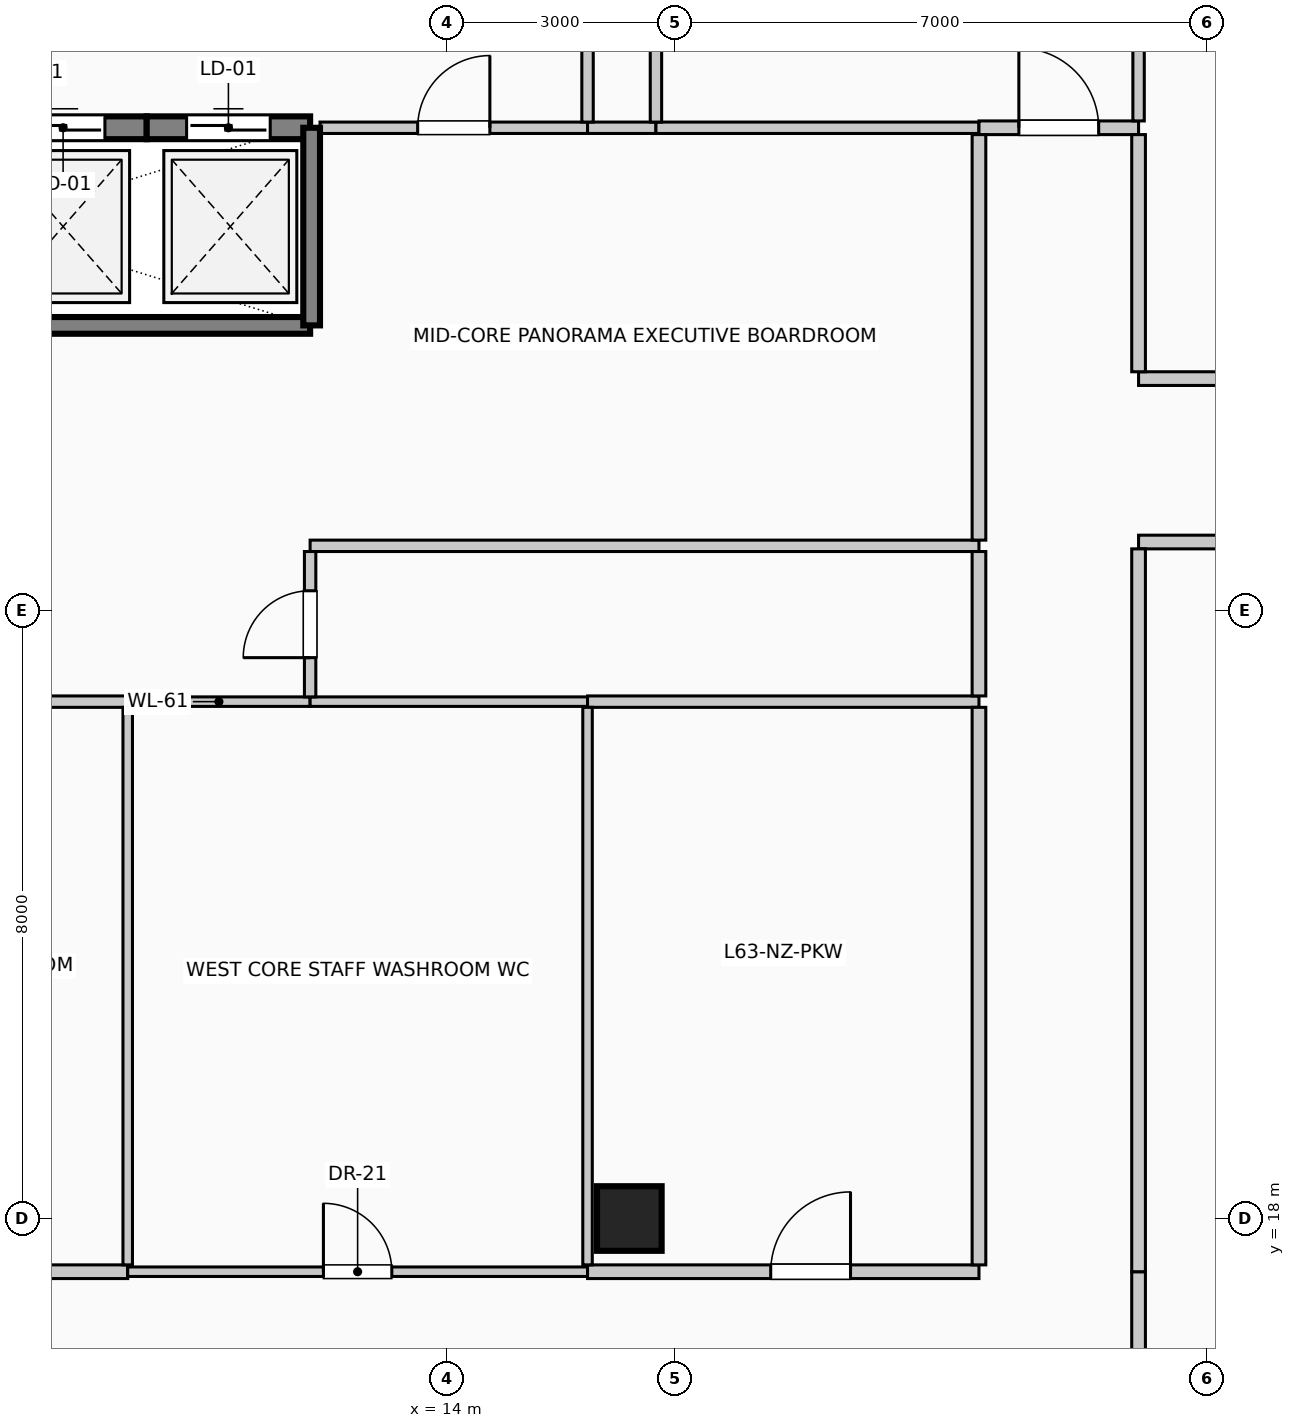
"""IFC4 building model, lengths in metres.
Left out: names, types, materials, properties, quantities, classifications, styles, units other than length and angle.
Written with IfcOpenShell. Run it as: python <this file> out.ifc"""

import sys

from ifc_helpers import new_model, si_unit, direction, frame, frame_2d, origin, origin_2d, place, context, subcontext, project, spatial, rectangle, circle, extrude, element, fill, save


model = new_model("IFC4")
c1 = context("Model", 3, precision=1e-05, world=origin(), true_north=direction((0.0, 1.0)))
c2 = subcontext(c1, "Body", "Model", "MODEL_VIEW")
j1 = project(units=[si_unit("LENGTHUNIT", "METRE"), si_unit("PLANEANGLEUNIT", "RADIAN")], contexts=[c1])
p1 = place(None, origin())
s1 = spatial("IfcSite", under=j1, at=p1, CompositionType="ELEMENT")
p2 = place(p1, origin())
s2 = spatial("IfcBuilding", under=s1, at=p2, CompositionType="ELEMENT")
p3 = place(p2, frame((0.0, 0.0, 260.6)))
s3 = spatial("IfcBuildingStorey", under=s2, at=p3, CompositionType="ELEMENT", Elevation=260.6)
p4 = place(p3, frame((16.4, 18.0, 0.0), z_axis=(0.0, 0.0, 1.0), x_axis=(1.0, 0.0, 0.0)))
e1 = element("IfcColumn", 1, at=p4, inside=s3, PredefinedType="COLUMN", context=c2, shape_type="SweptSolid", body=[
    extrude(circle(Radius=0.425, at=origin_2d()), origin(), (0.0, 0.0, 1.0), 4.0),
])
p5 = place(p3, frame((7.85, 32.35, 0.0), z_axis=(0.0, 0.0, 1.0), x_axis=(1.0, 0.0, 0.0)))
e2 = element("IfcWall", 2, at=p5, inside=s3, PredefinedType="SOLIDWALL", context=c2, shape_type="SweptSolid", body=[
    extrude(rectangle(XDim=2.2, YDim=0.3, at=frame_2d((1.1, 0.0))), origin(), (0.0, 0.0, 1.0), 4.0),
])
p6 = place(p5, frame((0.55, 0.0, 0.0)))
e3 = element("IfcOpeningElement", 3, at=p6, cuts=e2, PredefinedType="OPENING", context=c2, shape_type="SweptSolid", body=[
    extrude(rectangle(XDim=1.1, YDim=2.2, at=frame_2d((0.55, 1.1))), frame((0.0, 0.16, 0.0), z_axis=(0.0, -1.0, 0.0), x_axis=(1.0, 0.0, 0.0)), (0.0, 0.0, 1.0), 0.32),
])
p7 = place(p3, frame((10.05, 32.35, 0.0), z_axis=(0.0, 0.0, 1.0), x_axis=(1.0, 0.0, 0.0)))
e4 = element("IfcWall", 4, at=p7, inside=s3, PredefinedType="SOLIDWALL", context=c2, shape_type="SweptSolid", body=[
    extrude(rectangle(XDim=2.15, YDim=0.3, at=frame_2d((1.075, 0.0))), origin(), (0.0, 0.0, 1.0), 4.0),
])
p8 = place(p7, frame((0.525, 0.0, 0.0)))
e5 = element("IfcOpeningElement", 5, at=p8, cuts=e4, PredefinedType="OPENING", context=c2, shape_type="SweptSolid", body=[
    extrude(rectangle(XDim=1.1, YDim=2.2, at=frame_2d((0.55, 1.1))), frame((0.0, 0.16, 0.0), z_axis=(0.0, -1.0, 0.0), x_axis=(1.0, 0.0, 0.0)), (0.0, 0.0, 1.0), 0.32),
])
p9 = place(p3, frame((3.55, 29.75, 0.0), z_axis=(0.0, 0.0, 1.0), x_axis=(1.0, 0.0, 0.0)))
e6 = element("IfcWall", 6, at=p9, inside=s3, PredefinedType="SOLIDWALL", context=c2, shape_type="SweptSolid", body=[
    extrude(rectangle(XDim=8.65, YDim=0.22, at=frame_2d((4.325, 0.0))), origin(), (0.0, 0.0, 1.0), 4.0),
])
p10 = place(p3, frame((12.22, 29.75, 0.0), z_axis=(0.0, 0.0, 1.0), x_axis=(0.0, 1.0, 0.0)))
e7 = element("IfcWall", 7, at=p10, inside=s3, PredefinedType="SOLIDWALL", context=c2, shape_type="SweptSolid", body=[
    extrude(rectangle(XDim=2.6, YDim=0.22, at=frame_2d((1.3, 0.0))), origin(), (0.0, 0.0, 1.0), 4.0),
])
p11 = place(p3, frame((3.55, 17.3, 0.0), z_axis=(0.0, 0.0, 1.0), x_axis=(1.0, 0.0, 0.0)))
e8 = element("IfcWall", 8, at=p11, inside=s3, PredefinedType="PARTITIONING", context=c2, shape_type="SweptSolid", body=[
    extrude(rectangle(XDim=6.25, YDim=0.18, at=frame_2d((3.125, 0.0))), origin(), (0.0, 0.0, 1.0), 3.75),
])
p12 = place(p11, frame((2.6, 0.0, 0.0)))
e9 = element("IfcOpeningElement", 9, at=p12, cuts=e8, PredefinedType="OPENING", context=c2, shape_type="SweptSolid", body=[
    extrude(rectangle(XDim=1.05, YDim=2.15, at=frame_2d((0.525, 1.075))), frame((0.0, 0.1, 0.0), z_axis=(0.0, -1.0, 0.0), x_axis=(1.0, 0.0, 0.0)), (0.0, 0.0, 1.0), 0.2),
])
p13 = place(p3, frame((9.8, 17.3, 0.0), z_axis=(0.0, 0.0, 1.0), x_axis=(1.0, 0.0, 0.0)))
e10 = element("IfcWall", 10, at=p13, inside=s3, PredefinedType="PARTITIONING", context=c2, shape_type="SweptSolid", body=[
    extrude(rectangle(XDim=6.05, YDim=0.125, at=frame_2d((3.025, 0.0))), origin(), (0.0, 0.0, 1.0), 3.75),
])
p14 = place(p13, frame((2.575, 0.0, 0.0)))
e11 = element("IfcOpeningElement", 11, at=p14, cuts=e10, PredefinedType="OPENING", context=c2, shape_type="SweptSolid", body=[
    extrude(rectangle(XDim=0.9, YDim=2.1, at=frame_2d((0.45, 1.05))), frame((0.0, 0.073, 0.0), z_axis=(0.0, -1.0, 0.0), x_axis=(1.0, 0.0, 0.0)), (0.0, 0.0, 1.0), 0.145),
])
p15 = place(p3, frame((15.85, 17.3, 0.0), z_axis=(0.0, 0.0, 1.0), x_axis=(1.0, 0.0, 0.0)))
e12 = element("IfcWall", 12, at=p15, inside=s3, PredefinedType="PARTITIONING", context=c2, shape_type="SweptSolid", body=[
    extrude(rectangle(XDim=5.15, YDim=0.18, at=frame_2d((2.575, 0.0))), origin(), (0.0, 0.0, 1.0), 3.75),
])
p16 = place(p15, frame((2.41, 0.0, 0.0)))
e13 = element("IfcOpeningElement", 13, at=p16, cuts=e12, PredefinedType="OPENING", context=c2, shape_type="SweptSolid", body=[
    extrude(rectangle(XDim=1.05, YDim=2.15, at=frame_2d((0.525, 1.075))), frame((0.0, 0.1, 0.0), z_axis=(0.0, -1.0, 0.0), x_axis=(1.0, 0.0, 0.0)), (0.0, 0.0, 1.0), 0.2),
])
p17 = place(p3, frame((3.55, 24.8, 0.0), z_axis=(0.0, 0.0, 1.0), x_axis=(1.0, 0.0, 0.0)))
e14 = element("IfcWall", 14, at=p17, inside=s3, PredefinedType="PARTITIONING", context=c2, shape_type="SweptSolid", body=[
    extrude(rectangle(XDim=6.25, YDim=0.15, at=frame_2d((3.125, 0.0))), origin(), (0.0, 0.0, 1.0), 3.75),
])
p18 = place(p3, frame((9.8, 24.8, 0.0), z_axis=(0.0, 0.0, 1.0), x_axis=(1.0, 0.0, 0.0)))
e15 = element("IfcWall", 15, at=p18, inside=s3, PredefinedType="PARTITIONING", context=c2, shape_type="SweptSolid", body=[
    extrude(rectangle(XDim=2.4, YDim=0.125, at=frame_2d((1.2, 0.0))), origin(), (0.0, 0.0, 1.0), 3.75),
])
p19 = place(p3, frame((12.2, 24.8, 0.0), z_axis=(0.0, 0.0, 1.0), x_axis=(1.0, 0.0, 0.0)))
e16 = element("IfcWall", 16, at=p19, inside=s3, PredefinedType="PARTITIONING", context=c2, shape_type="SweptSolid", body=[
    extrude(rectangle(XDim=3.65, YDim=0.125, at=frame_2d((1.825, 0.0))), origin(), (0.0, 0.0, 1.0), 3.75),
])
p20 = place(p3, frame((15.85, 24.8, 0.0), z_axis=(0.0, 0.0, 1.0), x_axis=(1.0, 0.0, 0.0)))
e17 = element("IfcWall", 17, at=p20, inside=s3, PredefinedType="PARTITIONING", context=c2, shape_type="SweptSolid", body=[
    extrude(rectangle(XDim=5.15, YDim=0.15, at=frame_2d((2.575, 0.0))), origin(), (0.0, 0.0, 1.0), 3.75),
])
p21 = place(p3, frame((12.2, 26.85, 0.0), z_axis=(0.0, 0.0, 1.0), x_axis=(1.0, 0.0, 0.0)))
e18 = element("IfcWall", 18, at=p21, inside=s3, PredefinedType="PARTITIONING", context=c2, shape_type="SweptSolid", body=[
    extrude(rectangle(XDim=8.8, YDim=0.15, at=frame_2d((4.4, 0.0))), origin(), (0.0, 0.0, 1.0), 3.75),
])
p22 = place(p3, frame((23.1, 26.9, 0.0), z_axis=(0.0, 0.0, 1.0), x_axis=(1.0, 0.0, 0.0)))
e19 = element("IfcWall", 19, at=p22, inside=s3, PredefinedType="PARTITIONING", context=c2, shape_type="SweptSolid", body=[
    extrude(rectangle(XDim=4.12, YDim=0.18, at=frame_2d((2.06, 0.0))), origin(), (0.0, 0.0, 1.0), 3.75),
])
p23 = place(p22, frame((1.535, 0.0, 0.0)))
e20 = element("IfcOpeningElement", 20, at=p23, cuts=e19, PredefinedType="OPENING", context=c2, shape_type="SweptSolid", body=[
    extrude(rectangle(XDim=1.05, YDim=2.15, at=frame_2d((0.525, 1.075))), frame((0.0, 0.1, 0.0), z_axis=(0.0, -1.0, 0.0), x_axis=(1.0, 0.0, 0.0)), (0.0, 0.0, 1.0), 0.2),
])
p24 = place(p3, frame((23.1, 29.05, 0.0), z_axis=(0.0, 0.0, 1.0), x_axis=(1.0, 0.0, 0.0)))
e21 = element("IfcWall", 21, at=p24, inside=s3, PredefinedType="PARTITIONING", context=c2, shape_type="SweptSolid", body=[
    extrude(rectangle(XDim=7.13, YDim=0.18, at=frame_2d((3.565, 0.0))), origin(), (0.0, 0.0, 1.0), 3.75),
])
p25 = place(p24, frame((3.09, 0.0, 0.0)))
e22 = element("IfcOpeningElement", 22, at=p25, cuts=e21, PredefinedType="OPENING", context=c2, shape_type="SweptSolid", body=[
    extrude(rectangle(XDim=0.95, YDim=2.15, at=frame_2d((0.475, 1.075))), frame((0.0, 0.1, 0.0), z_axis=(0.0, -1.0, 0.0), x_axis=(1.0, 0.0, 0.0)), (0.0, 0.0, 1.0), 0.2),
])
p26 = place(p3, frame((12.33, 32.35, 0.0), z_axis=(0.0, 0.0, 1.0), x_axis=(1.0, 0.0, 0.0)))
e23 = element("IfcWall", 23, at=p26, inside=s3, PredefinedType="PARTITIONING", context=c2, shape_type="SweptSolid", body=[
    extrude(rectangle(XDim=3.52, YDim=0.15, at=frame_2d((1.76, 0.0))), origin(), (0.0, 0.0, 1.0), 3.75),
])
p27 = place(p26, frame((1.285, 0.0, 0.0)))
e24 = element("IfcOpeningElement", 24, at=p27, cuts=e23, PredefinedType="OPENING", context=c2, shape_type="SweptSolid", body=[
    extrude(rectangle(XDim=0.95, YDim=2.15, at=frame_2d((0.475, 1.075))), frame((0.0, 0.085, 0.0), z_axis=(0.0, -1.0, 0.0), x_axis=(1.0, 0.0, 0.0)), (0.0, 0.0, 1.0), 0.17),
])
p28 = place(p3, frame((15.85, 32.35, 0.0), z_axis=(0.0, 0.0, 1.0), x_axis=(1.0, 0.0, 0.0)))
e25 = element("IfcWall", 25, at=p28, inside=s3, PredefinedType="PARTITIONING", context=c2, shape_type="SweptSolid", body=[
    extrude(rectangle(XDim=0.9, YDim=0.15, at=frame_2d((0.45, 0.0))), origin(), (0.0, 0.0, 1.0), 3.75),
])
p29 = place(p3, frame((16.75, 32.35, 0.0), z_axis=(0.0, 0.0, 1.0), x_axis=(1.0, 0.0, 0.0)))
e26 = element("IfcWall", 26, at=p29, inside=s3, PredefinedType="PARTITIONING", context=c2, shape_type="SweptSolid", body=[
    extrude(rectangle(XDim=4.25, YDim=0.15, at=frame_2d((2.125, 0.0))), origin(), (0.0, 0.0, 1.0), 3.75),
])
p30 = place(p3, frame((21.0, 32.35, 0.0), z_axis=(0.0, 0.0, 1.0), x_axis=(1.0, 0.0, 0.0)))
e27 = element("IfcWall", 27, at=p30, inside=s3, PredefinedType="PARTITIONING", context=c2, shape_type="SweptSolid", body=[
    extrude(rectangle(XDim=2.1, YDim=0.18, at=frame_2d((1.05, 0.0))), origin(), (0.0, 0.0, 1.0), 3.75),
])
p31 = place(p30, frame((0.525, 0.0, 0.0)))
e28 = element("IfcOpeningElement", 28, at=p31, cuts=e27, PredefinedType="OPENING", context=c2, shape_type="SweptSolid", body=[
    extrude(rectangle(XDim=1.05, YDim=2.15, at=frame_2d((0.525, 1.075))), frame((0.0, 0.1, 0.0), z_axis=(0.0, -1.0, 0.0), x_axis=(1.0, 0.0, 0.0)), (0.0, 0.0, 1.0), 0.2),
])
p32 = place(p3, frame((9.8, 17.39, 0.0), z_axis=(0.0, 0.0, 1.0), x_axis=(0.0, 1.0, 0.0)))
e29 = element("IfcWall", 29, at=p32, inside=s3, PredefinedType="PARTITIONING", context=c2, shape_type="SweptSolid", body=[
    extrude(rectangle(XDim=7.335, YDim=0.125, at=frame_2d((3.667, 0.0))), origin(), (0.0, 0.0, 1.0), 3.75),
])
p33 = place(p3, frame((12.2, 24.863, 0.0), z_axis=(0.0, 0.0, 1.0), x_axis=(0.0, 1.0, 0.0)))
e30 = element("IfcWall", 30, at=p33, inside=s3, PredefinedType="PARTITIONING", context=c2, shape_type="SweptSolid", body=[
    extrude(rectangle(XDim=1.912, YDim=0.15, at=frame_2d((0.956, 0.0))), origin(), (0.0, 0.0, 1.0), 3.75),
])
p34 = place(p33, frame((0.516, 0.0, 0.0)))
e31 = element("IfcOpeningElement", 31, at=p34, cuts=e30, PredefinedType="OPENING", context=c2, shape_type="SweptSolid", body=[
    extrude(rectangle(XDim=0.88, YDim=2.1, at=frame_2d((0.44, 1.05))), frame((0.0, 0.085, 0.0), z_axis=(0.0, -1.0, 0.0), x_axis=(1.0, 0.0, 0.0)), (0.0, 0.0, 1.0), 0.17),
])
p35 = place(p3, frame((15.85, 17.39, 0.0), z_axis=(0.0, 0.0, 1.0), x_axis=(0.0, 1.0, 0.0)))
e32 = element("IfcWall", 32, at=p35, inside=s3, PredefinedType="PARTITIONING", context=c2, shape_type="SweptSolid", body=[
    extrude(rectangle(XDim=7.335, YDim=0.125, at=frame_2d((3.667, 0.0))), origin(), (0.0, 0.0, 1.0), 3.75),
])
p36 = place(p3, frame((15.85, 32.425, 0.0), z_axis=(0.0, 0.0, 1.0), x_axis=(0.0, 1.0, 0.0)))
e33 = element("IfcWall", 33, at=p36, inside=s3, PredefinedType="PARTITIONING", context=c2, shape_type="SweptSolid", body=[
    extrude(rectangle(XDim=1.725, YDim=0.15, at=frame_2d((0.862, 0.0))), origin(), (0.0, 0.0, 1.0), 3.75),
])
p37 = place(p3, frame((16.75, 32.425, 0.0), z_axis=(0.0, 0.0, 1.0), x_axis=(0.0, 1.0, 0.0)))
e34 = element("IfcWall", 34, at=p37, inside=s3, PredefinedType="PARTITIONING", context=c2, shape_type="SweptSolid", body=[
    extrude(rectangle(XDim=1.15, YDim=0.15, at=frame_2d((0.575, 0.0))), origin(), (0.0, 0.0, 1.0), 3.75),
])
p38 = place(p3, frame((21.0, 17.39, 0.0), z_axis=(0.0, 0.0, 1.0), x_axis=(0.0, 1.0, 0.0)))
e35 = element("IfcWall", 35, at=p38, inside=s3, PredefinedType="PARTITIONING", context=c2, shape_type="SweptSolid", body=[
    extrude(rectangle(XDim=7.335, YDim=0.18, at=frame_2d((3.667, 0.0))), origin(), (0.0, 0.0, 1.0), 3.75),
])
p39 = place(p3, frame((21.0, 24.875, 0.0), z_axis=(0.0, 0.0, 1.0), x_axis=(0.0, 1.0, 0.0)))
e36 = element("IfcWall", 36, at=p39, inside=s3, PredefinedType="PARTITIONING", context=c2, shape_type="SweptSolid", body=[
    extrude(rectangle(XDim=1.9, YDim=0.18, at=frame_2d((0.95, 0.0))), origin(), (0.0, 0.0, 1.0), 3.75),
])
p40 = place(p3, frame((21.0, 26.925, 0.0), z_axis=(0.0, 0.0, 1.0), x_axis=(0.0, 1.0, 0.0)))
e37 = element("IfcWall", 37, at=p40, inside=s3, PredefinedType="PARTITIONING", context=c2, shape_type="SweptSolid", body=[
    extrude(rectangle(XDim=5.335, YDim=0.18, at=frame_2d((2.667, 0.0))), origin(), (0.0, 0.0, 1.0), 3.75),
])
p41 = place(p3, frame((23.1, 15.29, 0.0), z_axis=(0.0, 0.0, 1.0), x_axis=(0.0, 1.0, 0.0)))
e38 = element("IfcWall", 38, at=p41, inside=s3, PredefinedType="PARTITIONING", context=c2, shape_type="SweptSolid", body=[
    extrude(rectangle(XDim=2.01, YDim=0.18, at=frame_2d((1.005, 0.0))), origin(), (0.0, 0.0, 1.0), 3.75),
])
p42 = place(p3, frame((23.1, 17.3, 0.0), z_axis=(0.0, 0.0, 1.0), x_axis=(0.0, 1.0, 0.0)))
e39 = element("IfcWall", 39, at=p42, inside=s3, PredefinedType="PARTITIONING", context=c2, shape_type="SweptSolid", body=[
    extrude(rectangle(XDim=9.51, YDim=0.18, at=frame_2d((4.755, 0.0))), origin(), (0.0, 0.0, 1.0), 3.75),
])
p43 = place(p3, frame((23.1, 29.14, 0.0), z_axis=(0.0, 0.0, 1.0), x_axis=(0.0, 1.0, 0.0)))
e40 = element("IfcWall", 40, at=p43, inside=s3, PredefinedType="PARTITIONING", context=c2, shape_type="SweptSolid", body=[
    extrude(rectangle(XDim=3.12, YDim=0.18, at=frame_2d((1.56, 0.0))), origin(), (0.0, 0.0, 1.0), 3.75),
])
p44 = place(p3, frame((23.1, 32.44, 0.0), z_axis=(0.0, 0.0, 1.0), x_axis=(0.0, 1.0, 0.0)))
e41 = element("IfcWall", 41, at=p44, inside=s3, PredefinedType="PARTITIONING", context=c2, shape_type="SweptSolid", body=[
    extrude(rectangle(XDim=12.84, YDim=0.15, at=frame_2d((6.42, 0.0))), origin(), (0.0, 0.0, 1.0), 3.75),
])
p45 = place(p6, origin())
e42 = element("IfcDoor", 42, at=p45, inside=s3, OperationType="SLIDING_TO_LEFT", PredefinedType="DOOR", context=c2, shape_type="SweptSolid", body=[
    extrude(rectangle(XDim=1.1, YDim=2.2, at=frame_2d((0.55, 1.1))), frame((0.0, 0.025, 0.0), z_axis=(0.0, -1.0, 0.0), x_axis=(1.0, 0.0, 0.0)), (0.0, 0.0, 1.0), 0.05),
])
fill(e3, e42)
p46 = place(p8, origin())
e43 = element("IfcDoor", 43, at=p46, inside=s3, OperationType="SLIDING_TO_RIGHT", PredefinedType="DOOR", context=c2, shape_type="SweptSolid", body=[
    extrude(rectangle(XDim=1.1, YDim=2.2, at=frame_2d((0.55, 1.1))), frame((0.0, 0.025, 0.0), z_axis=(0.0, -1.0, 0.0), x_axis=(1.0, 0.0, 0.0)), (0.0, 0.0, 1.0), 0.05),
])
fill(e5, e43)
p47 = place(p14, origin())
e44 = element("IfcDoor", 44, at=p47, inside=s3, OperationType="SINGLE_SWING_LEFT", PredefinedType="DOOR", context=c2, shape_type="SweptSolid", body=[
    extrude(rectangle(XDim=0.9, YDim=2.1, at=frame_2d((0.45, 1.05))), frame((0.0, 0.025, 0.0), z_axis=(0.0, -1.0, 0.0), x_axis=(1.0, 0.0, 0.0)), (0.0, 0.0, 1.0), 0.05),
])
fill(e11, e44)
p48 = place(p16, origin())
e45 = element("IfcDoor", 45, at=p48, inside=s3, OperationType="SINGLE_SWING_RIGHT", PredefinedType="DOOR", context=c2, shape_type="SweptSolid", body=[
    extrude(rectangle(XDim=1.05, YDim=2.15, at=frame_2d((0.525, 1.075))), frame((0.0, 0.025, 0.0), z_axis=(0.0, -1.0, 0.0), x_axis=(1.0, 0.0, 0.0)), (0.0, 0.0, 1.0), 0.05),
])
fill(e13, e45)
p49 = place(p27, origin())
e46 = element("IfcDoor", 46, at=p49, inside=s3, OperationType="SINGLE_SWING_RIGHT", PredefinedType="DOOR", context=c2, shape_type="SweptSolid", body=[
    extrude(rectangle(XDim=0.95, YDim=2.15, at=frame_2d((0.475, 1.075))), frame((0.0, 0.025, 0.0), z_axis=(0.0, -1.0, 0.0), x_axis=(1.0, 0.0, 0.0)), (0.0, 0.0, 1.0), 0.05),
])
fill(e24, e46)
p50 = place(p31, origin())
e47 = element("IfcDoor", 47, at=p50, inside=s3, OperationType="SINGLE_SWING_LEFT", PredefinedType="DOOR", context=c2, shape_type="SweptSolid", body=[
    extrude(rectangle(XDim=1.05, YDim=2.15, at=frame_2d((0.525, 1.075))), frame((0.0, 0.025, 0.0), z_axis=(0.0, -1.0, 0.0), x_axis=(1.0, 0.0, 0.0)), (0.0, 0.0, 1.0), 0.05),
])
fill(e28, e47)
p51 = place(p34, origin())
e48 = element("IfcDoor", 48, at=p51, inside=s3, OperationType="SINGLE_SWING_LEFT", PredefinedType="DOOR", context=c2, shape_type="SweptSolid", body=[
    extrude(rectangle(XDim=0.88, YDim=2.1, at=frame_2d((0.44, 1.05))), frame((0.0, 0.025, 0.0), z_axis=(0.0, -1.0, 0.0), x_axis=(1.0, 0.0, 0.0)), (0.0, 0.0, 1.0), 0.05),
])
fill(e31, e48)
save(model, sys.argv[1])
